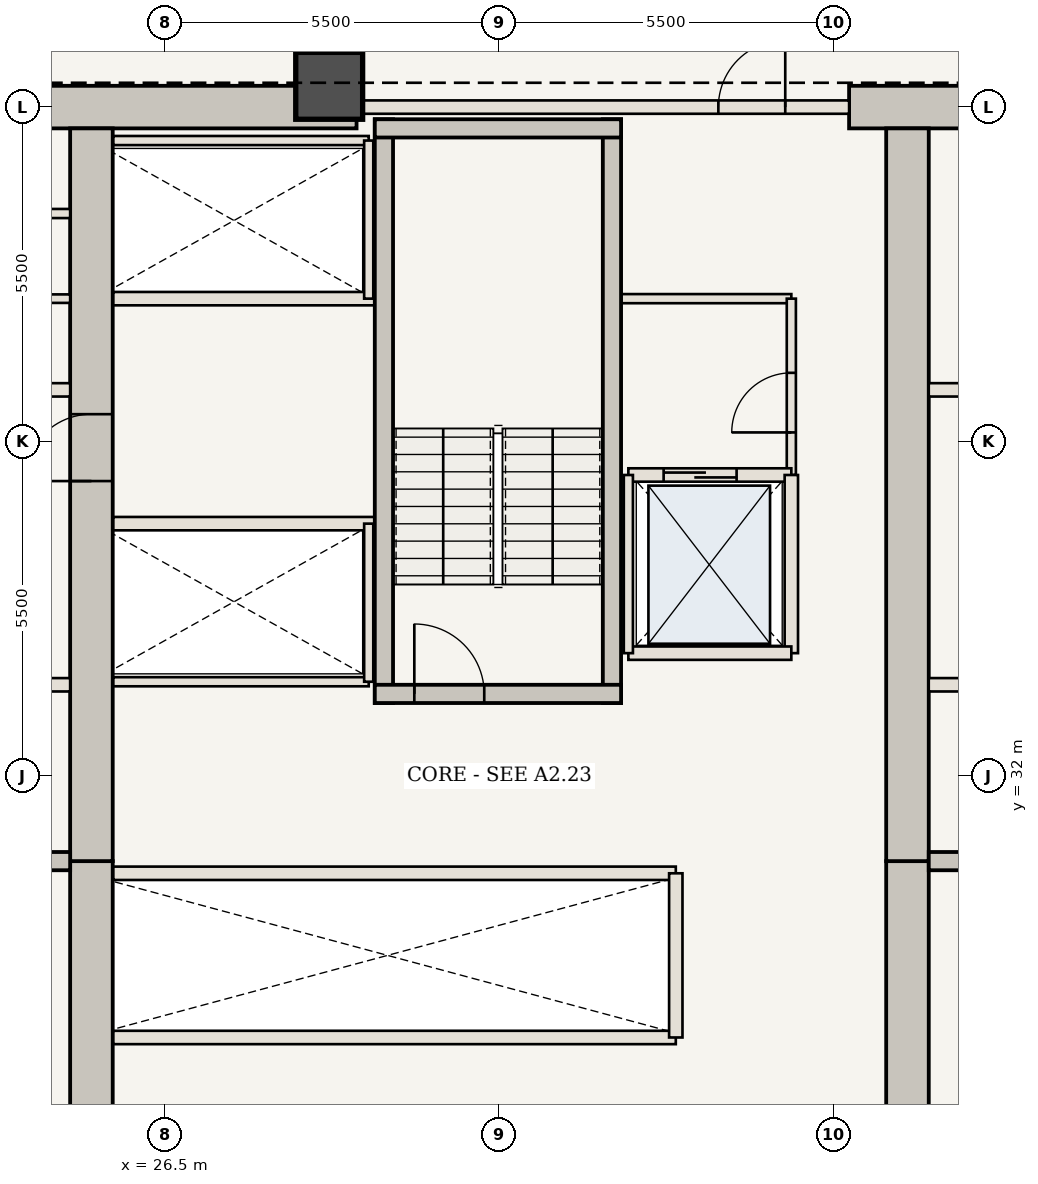
"""IFC4 building model, lengths in metres.
Left out: names, types, materials, properties, quantities, classifications, styles, units other than length and angle.
Written with IfcOpenShell. Run it as: python <this file> out.ifc"""

import sys

from ifc_helpers import new_model, si_unit, direction, frame, frame_2d, origin, origin_2d, place, context, subcontext, project, spatial, rectangle, extrude, element, fill, save


model = new_model("IFC4")
c1 = context("Model", 3, precision=1e-05, world=origin(), true_north=direction((0.0, 1.0)))
c2 = subcontext(c1, "Body", "Model", "MODEL_VIEW")
j1 = project(units=[si_unit("LENGTHUNIT", "METRE"), si_unit("PLANEANGLEUNIT", "RADIAN")], contexts=[c1])
p1 = place(None, origin())
s1 = spatial("IfcSite", under=j1, at=p1, CompositionType="ELEMENT")
p2 = place(p1, origin())
s2 = spatial("IfcBuilding", under=s1, at=p2, CompositionType="ELEMENT")
p3 = place(p2, frame((0.0, 0.0, 92.75)))
s3 = spatial("IfcBuildingStorey", under=s2, at=p3, CompositionType="ELEMENT", Elevation=92.75)
p4 = place(p3, frame((21.41, 43.0, 0.0), z_axis=(0.0, 0.0, 1.0), x_axis=(1.0, 0.0, 0.0)))
e1 = element("IfcWall", 1, at=p4, inside=s3, PredefinedType="SHEAR", context=c2, shape_type="SweptSolid", body=[
    extrude(rectangle(XDim=8.24, YDim=0.7, at=frame_2d((4.12, 0.0))), origin(), (0.0, 0.0, 1.0), 3.5),
])
p5 = place(p3, frame((37.75, 43.0, 0.0), z_axis=(0.0, 0.0, 1.0), x_axis=(1.0, 0.0, 0.0)))
e2 = element("IfcWall", 2, at=p5, inside=s3, PredefinedType="SHEAR", context=c2, shape_type="SweptSolid", body=[
    extrude(rectangle(XDim=4.84, YDim=0.7, at=frame_2d((2.42, 0.0))), origin(), (0.0, 0.0, 1.0), 3.5),
])
p6 = place(p3, frame((25.29, 21.3, 0.0), z_axis=(0.0, 0.0, 1.0), x_axis=(0.0, 1.0, 0.0)))
e3 = element("IfcWall", 3, at=p6, inside=s3, PredefinedType="SHEAR", context=c2, shape_type="SweptSolid", body=[
    extrude(rectangle(XDim=9.3, YDim=0.7, at=frame_2d((4.65, 0.0))), origin(), (0.0, 0.0, 1.0), 3.5),
])
p7 = place(p3, frame((25.29, 30.6, 0.0), z_axis=(0.0, 0.0, 1.0), x_axis=(0.0, 1.0, 0.0)))
e4 = element("IfcWall", 4, at=p7, inside=s3, PredefinedType="SHEAR", context=c2, shape_type="SweptSolid", body=[
    extrude(rectangle(XDim=12.05, YDim=0.7, at=frame_2d((6.025, 0.0))), origin(), (0.0, 0.0, 1.0), 3.5),
])
p8 = place(p7, frame((6.25, 0.0, 0.0)))
e5 = element("IfcOpeningElement", 5, at=p8, cuts=e4, PredefinedType="OPENING", context=c2, shape_type="SweptSolid", body=[
    extrude(rectangle(XDim=1.1, YDim=2.15, at=frame_2d((0.55, 1.075))), frame((0.0, 0.36, 0.0), z_axis=(0.0, -1.0, 0.0), x_axis=(1.0, 0.0, 0.0)), (0.0, 0.0, 1.0), 0.72),
])
p9 = place(p3, frame((38.71, 21.3, 0.0), z_axis=(0.0, 0.0, 1.0), x_axis=(0.0, 1.0, 0.0)))
e6 = element("IfcWall", 6, at=p9, inside=s3, PredefinedType="SHEAR", context=c2, shape_type="SweptSolid", body=[
    extrude(rectangle(XDim=9.3, YDim=0.7, at=frame_2d((4.65, 0.0))), origin(), (0.0, 0.0, 1.0), 3.5),
])
p10 = place(p3, frame((38.71, 30.6, 0.0), z_axis=(0.0, 0.0, 1.0), x_axis=(0.0, 1.0, 0.0)))
e7 = element("IfcWall", 7, at=p10, inside=s3, PredefinedType="SHEAR", context=c2, shape_type="SweptSolid", body=[
    extrude(rectangle(XDim=12.05, YDim=0.7, at=frame_2d((6.025, 0.0))), origin(), (0.0, 0.0, 1.0), 3.5),
])
p11 = place(p3, frame((29.2, 43.35, 0.0), z_axis=(0.0, 0.0, 1.0), x_axis=(1.0, 0.0, 0.0)))
e8 = element("IfcColumn", 8, at=p11, inside=s3, PredefinedType="COLUMN", context=c2, shape_type="SweptSolid", body=[
    extrude(rectangle(XDim=1.1, YDim=1.1, at=origin_2d()), origin(), (0.0, 0.0, 1.0), 3.5),
])
for number, where, z_axis, x_axis in (
    (9, (21.41, 30.6, 0.0), (0.0, 0.0, 1.0), (1.0, 0.0, 0.0)),
    (10, (39.06, 30.6, 0.0), (0.0, 0.0, 1.0), (1.0, 0.0, 0.0)),
):
    element("IfcWall", number, at=place(p3, frame(where, z_axis=z_axis, x_axis=x_axis)), inside=s3, PredefinedType="SHEAR", context=c2, shape_type="SweptSolid", body=[
        extrude(rectangle(XDim=3.53, YDim=0.3, at=frame_2d((1.765, 0.0))), origin(), (0.0, 0.0, 1.0), 3.28),
    ])
p12 = place(p3, frame((21.41, 33.5, 0.0), z_axis=(0.0, 0.0, 1.0), x_axis=(1.0, 0.0, 0.0)))
e11 = element("IfcWall", 11, at=p12, inside=s3, PredefinedType="STANDARD", context=c2, shape_type="SweptSolid", body=[
    extrude(rectangle(XDim=3.53, YDim=0.22, at=frame_2d((1.765, 0.0))), origin(), (0.0, 0.0, 1.0), 3.28),
])
p13 = place(p12, frame((0.75, 0.0, 0.0)))
e12 = element("IfcOpeningElement", 12, at=p13, cuts=e11, PredefinedType="OPENING", context=c2, shape_type="SweptSolid", body=[
    extrude(rectangle(XDim=1.2, YDim=2.2, at=frame_2d((0.6, 1.1))), frame((0.0, 0.12, 0.0), z_axis=(0.0, -1.0, 0.0), x_axis=(1.0, 0.0, 0.0)), (0.0, 0.0, 1.0), 0.24),
])
p14 = place(p3, frame((39.06, 33.5, 0.0), z_axis=(0.0, 0.0, 1.0), x_axis=(1.0, 0.0, 0.0)))
e13 = element("IfcWall", 13, at=p14, inside=s3, PredefinedType="STANDARD", context=c2, shape_type="SweptSolid", body=[
    extrude(rectangle(XDim=3.53, YDim=0.22, at=frame_2d((1.765, 0.0))), origin(), (0.0, 0.0, 1.0), 3.28),
])
p15 = place(p14, frame((1.55, 0.0, 0.0)))
e14 = element("IfcOpeningElement", 14, at=p15, cuts=e13, PredefinedType="OPENING", context=c2, shape_type="SweptSolid", body=[
    extrude(rectangle(XDim=1.2, YDim=2.2, at=frame_2d((0.6, 1.1))), frame((0.0, 0.12, 0.0), z_axis=(0.0, -1.0, 0.0), x_axis=(1.0, 0.0, 0.0)), (0.0, 0.0, 1.0), 0.24),
])
for number, where, z_axis, x_axis in (
    (15, (21.41, 38.35, 0.0), (0.0, 0.0, 1.0), (1.0, 0.0, 0.0)),
    (16, (39.06, 38.35, 0.0), (0.0, 0.0, 1.0), (1.0, 0.0, 0.0)),
):
    element("IfcWall", number, at=place(p3, frame(where, z_axis=z_axis, x_axis=x_axis)), inside=s3, PredefinedType="STANDARD", context=c2, shape_type="SweptSolid", body=[
        extrude(rectangle(XDim=3.53, YDim=0.22, at=frame_2d((1.765, 0.0))), origin(), (0.0, 0.0, 1.0), 3.28),
    ])
p16 = place(p3, frame((21.41, 39.85, 0.0), z_axis=(0.0, 0.0, 1.0), x_axis=(1.0, 0.0, 0.0)))
e17 = element("IfcWall", 17, at=p16, inside=s3, PredefinedType="STANDARD", context=c2, shape_type="SweptSolid", body=[
    extrude(rectangle(XDim=3.53, YDim=0.14, at=frame_2d((1.765, 0.0))), origin(), (0.0, 0.0, 1.0), 3.28),
])
p17 = place(p3, frame((21.41, 41.25, 0.0), z_axis=(0.0, 0.0, 1.0), x_axis=(1.0, 0.0, 0.0)))
e18 = element("IfcWall", 18, at=p17, inside=s3, PredefinedType="STANDARD", context=c2, shape_type="SweptSolid", body=[
    extrude(rectangle(XDim=3.53, YDim=0.15, at=frame_2d((1.765, 0.0))), origin(), (0.0, 0.0, 1.0), 3.28),
])
p18 = place(p3, frame((34.0, 39.85, 0.0), z_axis=(0.0, 0.0, 1.0), x_axis=(1.0, 0.0, 0.0)))
e19 = element("IfcWall", 19, at=p18, inside=s3, PredefinedType="STANDARD", context=c2, shape_type="SweptSolid", body=[
    extrude(rectangle(XDim=2.8, YDim=0.15, at=frame_2d((1.4, 0.0))), origin(), (0.0, 0.0, 1.0), 3.28),
])
p19 = place(p3, frame((36.8, 36.95, 0.0), z_axis=(0.0, 0.0, 1.0), x_axis=(0.0, 1.0, 0.0)))
e20 = element("IfcWall", 20, at=p19, inside=s3, PredefinedType="STANDARD", context=c2, shape_type="SweptSolid", body=[
    extrude(rectangle(XDim=2.9, YDim=0.15, at=frame_2d((1.45, 0.0))), origin(), (0.0, 0.0, 1.0), 3.28),
])
p20 = place(p19, frame((0.7, 0.0, 0.0)))
e21 = element("IfcOpeningElement", 21, at=p20, cuts=e20, PredefinedType="OPENING", context=c2, shape_type="SweptSolid", body=[
    extrude(rectangle(XDim=0.98, YDim=2.2, at=frame_2d((0.49, 1.1))), frame((0.0, 0.085, 0.0), z_axis=(0.0, -1.0, 0.0), x_axis=(1.0, 0.0, 0.0)), (0.0, 0.0, 1.0), 0.17),
])
for number, where, z_axis, x_axis in (
    (22, (25.65, 27.7, 0.0), (0.0, 0.0, 1.0), (1.0, 0.0, 0.0)),
    (23, (25.65, 30.4, 0.0), (0.0, 0.0, 1.0), (1.0, 0.0, 0.0)),
):
    element("IfcWall", number, at=place(p3, frame(where, z_axis=z_axis, x_axis=x_axis)), inside=s3, PredefinedType="STANDARD", context=c2, shape_type="SweptSolid", body=[
        extrude(rectangle(XDim=9.25, YDim=0.22, at=frame_2d((4.625, 0.0))), origin(), (0.0, 0.0, 1.0), 3.28),
    ])
p21 = place(p3, frame((34.9, 27.7, 0.0), z_axis=(0.0, 0.0, 1.0), x_axis=(0.0, 1.0, 0.0)))
e24 = element("IfcWall", 24, at=p21, inside=s3, PredefinedType="STANDARD", context=c2, shape_type="SweptSolid", body=[
    extrude(rectangle(XDim=2.7, YDim=0.22, at=frame_2d((1.35, 0.0))), origin(), (0.0, 0.0, 1.0), 3.28),
])
p22 = place(p3, frame((25.65, 36.15, 0.0), z_axis=(0.0, 0.0, 1.0), x_axis=(1.0, 0.0, 0.0)))
e25 = element("IfcWall", 25, at=p22, inside=s3, PredefinedType="STANDARD", context=c2, shape_type="SweptSolid", body=[
    extrude(rectangle(XDim=4.3, YDim=0.22, at=frame_2d((2.15, 0.0))), origin(), (0.0, 0.0, 1.0), 3.28),
])
p23 = place(p3, frame((25.65, 33.55, 0.0), z_axis=(0.0, 0.0, 1.0), x_axis=(1.0, 0.0, 0.0)))
e26 = element("IfcWall", 26, at=p23, inside=s3, PredefinedType="STANDARD", context=c2, shape_type="SweptSolid", body=[
    extrude(rectangle(XDim=4.2, YDim=0.15, at=frame_2d((2.1, 0.0))), origin(), (0.0, 0.0, 1.0), 3.28),
])
p24 = place(p3, frame((29.85, 33.55, 0.0), z_axis=(0.0, 0.0, 1.0), x_axis=(0.0, 1.0, 0.0)))
e27 = element("IfcWall", 27, at=p24, inside=s3, PredefinedType="STANDARD", context=c2, shape_type="SweptSolid", body=[
    extrude(rectangle(XDim=2.6, YDim=0.15, at=frame_2d((1.3, 0.0))), origin(), (0.0, 0.0, 1.0), 3.28),
])
p25 = place(p3, frame((25.65, 39.85, 0.0), z_axis=(0.0, 0.0, 1.0), x_axis=(1.0, 0.0, 0.0)))
e28 = element("IfcWall", 28, at=p25, inside=s3, PredefinedType="STANDARD", context=c2, shape_type="SweptSolid", body=[
    extrude(rectangle(XDim=4.3, YDim=0.22, at=frame_2d((2.15, 0.0))), origin(), (0.0, 0.0, 1.0), 3.28),
])
p26 = place(p3, frame((25.65, 42.45, 0.0), z_axis=(0.0, 0.0, 1.0), x_axis=(1.0, 0.0, 0.0)))
e29 = element("IfcWall", 29, at=p26, inside=s3, PredefinedType="STANDARD", context=c2, shape_type="SweptSolid", body=[
    extrude(rectangle(XDim=4.2, YDim=0.15, at=frame_2d((2.1, 0.0))), origin(), (0.0, 0.0, 1.0), 3.28),
])
p27 = place(p3, frame((29.85, 39.85, 0.0), z_axis=(0.0, 0.0, 1.0), x_axis=(0.0, 1.0, 0.0)))
e30 = element("IfcWall", 30, at=p27, inside=s3, PredefinedType="STANDARD", context=c2, shape_type="SweptSolid", body=[
    extrude(rectangle(XDim=2.6, YDim=0.15, at=frame_2d((1.3, 0.0))), origin(), (0.0, 0.0, 1.0), 3.28),
])
for number, where, z_axis, x_axis in (
    (31, (30.1, 33.2, 0.0), (0.0, 0.0, 1.0), (0.0, 1.0, 0.0)),
    (32, (33.85, 33.2, 0.0), (0.0, 0.0, 1.0), (0.0, 1.0, 0.0)),
):
    element("IfcWall", number, at=place(p3, frame(where, z_axis=z_axis, x_axis=x_axis)), inside=s3, PredefinedType="SHEAR", context=c2, shape_type="SweptSolid", body=[
        extrude(rectangle(XDim=9.6, YDim=0.3, at=frame_2d((4.8, 0.0))), origin(), (0.0, 0.0, 1.0), 3.28),
    ])
p28 = place(p3, frame((29.95, 33.35, 0.0), z_axis=(0.0, 0.0, 1.0), x_axis=(1.0, 0.0, 0.0)))
e33 = element("IfcWall", 33, at=p28, inside=s3, PredefinedType="SHEAR", context=c2, shape_type="SweptSolid", body=[
    extrude(rectangle(XDim=4.05, YDim=0.3, at=frame_2d((2.025, 0.0))), origin(), (0.0, 0.0, 1.0), 3.28),
])
p29 = place(p28, frame((0.65, 0.0, 0.0)))
e34 = element("IfcOpeningElement", 34, at=p29, cuts=e33, PredefinedType="OPENING", context=c2, shape_type="SweptSolid", body=[
    extrude(rectangle(XDim=1.15, YDim=2.15, at=frame_2d((0.575, 1.075))), frame((0.0, 0.16, 0.0), z_axis=(0.0, -1.0, 0.0), x_axis=(1.0, 0.0, 0.0)), (0.0, 0.0, 1.0), 0.32),
])
p30 = place(p3, frame((29.95, 42.65, 0.0), z_axis=(0.0, 0.0, 1.0), x_axis=(1.0, 0.0, 0.0)))
e35 = element("IfcWall", 35, at=p30, inside=s3, PredefinedType="SHEAR", context=c2, shape_type="SweptSolid", body=[
    extrude(rectangle(XDim=4.05, YDim=0.3, at=frame_2d((2.025, 0.0))), origin(), (0.0, 0.0, 1.0), 3.28),
])
p31 = place(p3, frame((29.65, 43.0, 0.0), z_axis=(0.0, 0.0, 1.0), x_axis=(1.0, 0.0, 0.0)))
e36 = element("IfcWall", 36, at=p31, inside=s3, PredefinedType="STANDARD", context=c2, shape_type="SweptSolid", body=[
    extrude(rectangle(XDim=8.1, YDim=0.22, at=frame_2d((4.05, 0.0))), origin(), (0.0, 0.0, 1.0), 3.28),
])
p32 = place(p31, frame((5.95, 0.0, 0.0)))
e37 = element("IfcOpeningElement", 37, at=p32, cuts=e36, PredefinedType="OPENING", context=c2, shape_type="SweptSolid", body=[
    extrude(rectangle(XDim=1.1, YDim=2.15, at=frame_2d((0.55, 1.075))), frame((0.0, 0.12, 0.0), z_axis=(0.0, -1.0, 0.0), x_axis=(1.0, 0.0, 0.0)), (0.0, 0.0, 1.0), 0.24),
])
p33 = place(p3, frame((34.12, 36.95, 0.0), z_axis=(0.0, 0.0, 1.0), x_axis=(1.0, 0.0, 0.0)))
e38 = element("IfcWall", 38, at=p33, inside=s3, PredefinedType="STANDARD", context=c2, shape_type="SweptSolid", body=[
    extrude(rectangle(XDim=2.68, YDim=0.22, at=frame_2d((1.34, 0.0))), origin(), (0.0, 0.0, 1.0), 3.28),
])
p34 = place(p33, frame((0.58, 0.0, 0.0)))
e39 = element("IfcOpeningElement", 39, at=p34, cuts=e38, PredefinedType="OPENING", context=c2, shape_type="SweptSolid", body=[
    extrude(rectangle(XDim=1.2, YDim=2.2, at=frame_2d((0.6, 1.1))), frame((0.0, 0.12, 0.0), z_axis=(0.0, -1.0, 0.0), x_axis=(1.0, 0.0, 0.0)), (0.0, 0.0, 1.0), 0.24),
])
p35 = place(p3, frame((36.8, 34.02, 0.0), z_axis=(0.0, 0.0, 1.0), x_axis=(0.0, 1.0, 0.0)))
e40 = element("IfcWall", 40, at=p35, inside=s3, PredefinedType="STANDARD", context=c2, shape_type="SweptSolid", body=[
    extrude(rectangle(XDim=2.93, YDim=0.22, at=frame_2d((1.465, 0.0))), origin(), (0.0, 0.0, 1.0), 3.28),
])
p36 = place(p3, frame((34.12, 34.02, 0.0), z_axis=(0.0, 0.0, 1.0), x_axis=(1.0, 0.0, 0.0)))
e41 = element("IfcWall", 41, at=p36, inside=s3, PredefinedType="STANDARD", context=c2, shape_type="SweptSolid", body=[
    extrude(rectangle(XDim=2.68, YDim=0.22, at=frame_2d((1.34, 0.0))), origin(), (0.0, 0.0, 1.0), 3.28),
])
p37 = place(p3, frame((34.12, 34.02, 0.0), z_axis=(0.0, 0.0, 1.0), x_axis=(0.0, 1.0, 0.0)))
e42 = element("IfcWall", 42, at=p37, inside=s3, PredefinedType="STANDARD", context=c2, shape_type="SweptSolid", body=[
    extrude(rectangle(XDim=2.93, YDim=0.15, at=frame_2d((1.465, 0.0))), origin(), (0.0, 0.0, 1.0), 3.28),
])
p38 = place(p8, origin())
e43 = element("IfcDoor", 43, at=p38, inside=s3, OperationType="SINGLE_SWING_LEFT", PredefinedType="DOOR", context=c2, shape_type="SweptSolid", body=[
    extrude(rectangle(XDim=1.1, YDim=2.15, at=frame_2d((0.55, 1.075))), frame((0.0, 0.025, 0.0), z_axis=(0.0, -1.0, 0.0), x_axis=(1.0, 0.0, 0.0)), (0.0, 0.0, 1.0), 0.05),
])
fill(e5, e43)
p39 = place(p20, origin())
e44 = element("IfcDoor", 44, at=p39, inside=s3, OperationType="SINGLE_SWING_LEFT", PredefinedType="DOOR", context=c2, shape_type="SweptSolid", body=[
    extrude(rectangle(XDim=0.98, YDim=2.2, at=frame_2d((0.49, 1.1))), frame((0.0, 0.025, 0.0), z_axis=(0.0, -1.0, 0.0), x_axis=(1.0, 0.0, 0.0)), (0.0, 0.0, 1.0), 0.05),
])
fill(e21, e44)
p40 = place(p29, origin())
e45 = element("IfcDoor", 45, at=p40, inside=s3, OperationType="SINGLE_SWING_LEFT", PredefinedType="DOOR", context=c2, shape_type="SweptSolid", body=[
    extrude(rectangle(XDim=1.15, YDim=2.15, at=frame_2d((0.575, 1.075))), frame((0.0, 0.025, 0.0), z_axis=(0.0, -1.0, 0.0), x_axis=(1.0, 0.0, 0.0)), (0.0, 0.0, 1.0), 0.05),
])
fill(e34, e45)
p41 = place(p32, origin())
e46 = element("IfcDoor", 46, at=p41, inside=s3, OperationType="SINGLE_SWING_RIGHT", PredefinedType="DOOR", context=c2, shape_type="SweptSolid", body=[
    extrude(rectangle(XDim=1.1, YDim=2.15, at=frame_2d((0.55, 1.075))), frame((0.0, 0.025, 0.0), z_axis=(0.0, -1.0, 0.0), x_axis=(1.0, 0.0, 0.0)), (0.0, 0.0, 1.0), 0.05),
])
fill(e37, e46)
p42 = place(p34, origin())
e47 = element("IfcDoor", 47, at=p42, inside=s3, OperationType="DOUBLE_DOOR_SLIDING", PredefinedType="DOOR", context=c2, shape_type="SweptSolid", body=[
    extrude(rectangle(XDim=1.2, YDim=2.2, at=frame_2d((0.6, 1.1))), frame((0.0, 0.025, 0.0), z_axis=(0.0, -1.0, 0.0), x_axis=(1.0, 0.0, 0.0)), (0.0, 0.0, 1.0), 0.05),
])
fill(e39, e47)
save(model, sys.argv[1])
